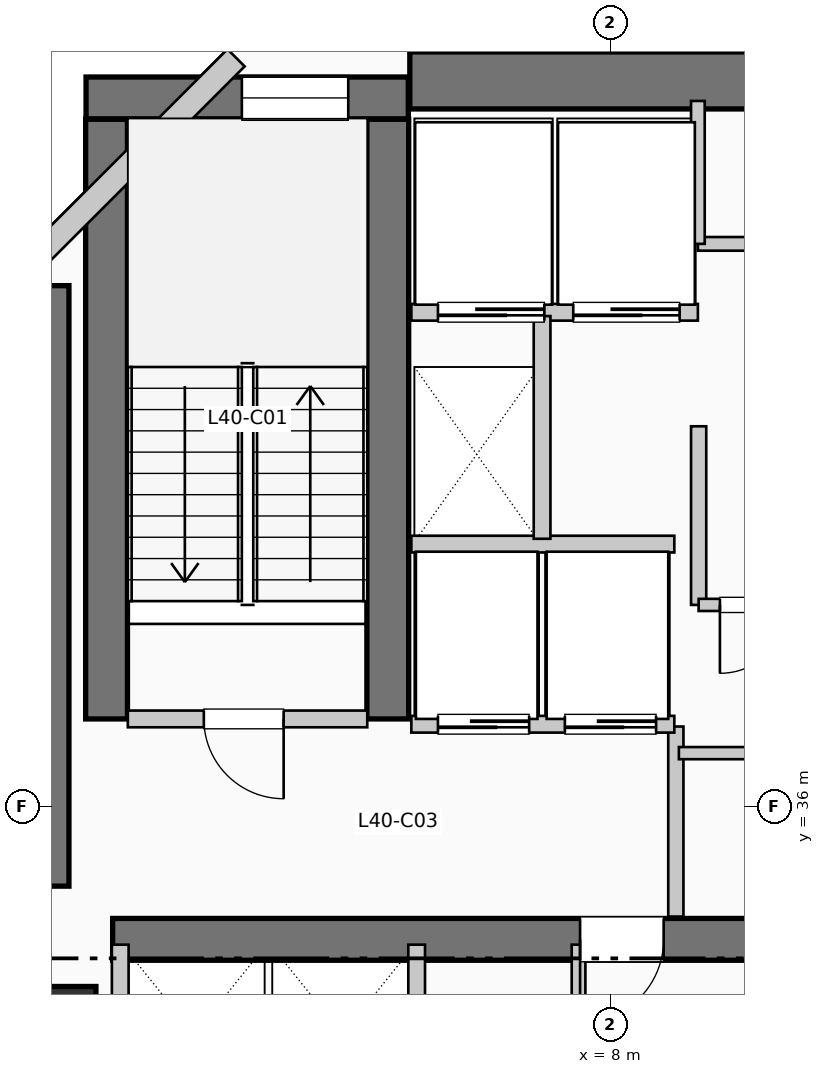
"""IFC4 building model, lengths in metres.
Left out: names, types, materials, properties, quantities, classifications, styles, units other than length and angle.
Written with IfcOpenShell. Run it as: python <this file> out.ifc"""

import sys

from ifc_helpers import new_model, si_unit, direction, frame, frame_2d, origin, origin_2d, place, context, subcontext, project, spatial, rectangle, extrude, element, fill, save


model = new_model("IFC4")
c1 = context("Model", 3, precision=1e-05, world=origin(), true_north=direction((0.0, 1.0)))
c2 = subcontext(c1, "Body", "Model", "MODEL_VIEW")
j1 = project(units=[si_unit("LENGTHUNIT", "METRE"), si_unit("PLANEANGLEUNIT", "RADIAN")], contexts=[c1])
p1 = place(None, origin())
s1 = spatial("IfcSite", under=j1, at=p1, CompositionType="ELEMENT")
p2 = place(p1, origin())
s2 = spatial("IfcBuilding", under=s1, at=p2, CompositionType="ELEMENT")
p3 = place(p2, frame((0.0, 0.0, 166.65)))
s3 = spatial("IfcBuildingStorey", under=s2, at=p3, CompositionType="ELEMENT", Elevation=166.65)
p4 = place(p3, frame((5.36, 45.55, 0.0), z_axis=(0.0, 0.0, 1.0), x_axis=(1.0, 0.0, 0.0)))
e1 = element("IfcWall", 1, at=p4, inside=s3, PredefinedType="SHEAR", context=c2, shape_type="SweptSolid", body=[
    extrude(rectangle(XDim=13.98, YDim=0.75, at=frame_2d((6.99, 0.0))), origin(), (0.0, 0.0, 1.0), 3.96),
])
p5 = place(p3, frame((0.5, 34.95, 0.0), z_axis=(0.0, 0.0, 1.0), x_axis=(0.0, 1.0, 0.0)))
e2 = element("IfcWall", 2, at=p5, inside=s3, PredefinedType="SHEAR", context=c2, shape_type="SweptSolid", body=[
    extrude(rectangle(XDim=7.9, YDim=0.75, at=frame_2d((3.95, 0.0))), origin(), (0.0, 0.0, 1.0), 3.96),
])
p6 = place(p3, frame((1.45, 34.25, 0.0), z_axis=(0.0, 0.0, 1.0), x_axis=(1.0, 0.0, 0.0)))
e3 = element("IfcWall", 3, at=p6, inside=s3, PredefinedType="SHEAR", context=c2, shape_type="SweptSolid", body=[
    extrude(rectangle(XDim=10.71, YDim=0.55, at=frame_2d((5.355, 0.0))), origin(), (0.0, 0.0, 1.0), 3.96),
])
p7 = place(p6, frame((7.25, 0.0, 0.0), z_axis=(0.0, 0.0, 1.0), x_axis=(-1.0, 0.0, 0.0)))
e4 = element("IfcOpeningElement", 4, at=p7, cuts=e3, PredefinedType="OPENING", context=c2, shape_type="SweptSolid", body=[
    extrude(rectangle(XDim=1.1, YDim=2.15, at=frame_2d((0.55, 1.075))), frame((0.0, 0.285, 0.0), z_axis=(0.0, -1.0, 0.0), x_axis=(1.0, 0.0, 0.0)), (0.0, 0.0, 1.0), 0.57),
])
for number, where, z_axis, x_axis in (
    (5, (1.37, 37.15, 0.0), (0.0, 0.0, 1.0), (0.0, 1.0, 0.0)),
    (6, (5.07, 37.15, 0.0), (0.0, 0.0, 1.0), (0.0, 1.0, 0.0)),
):
    element("IfcWall", number, at=place(p3, frame(where, z_axis=z_axis, x_axis=x_axis)), inside=s3, PredefinedType="SHEAR", context=c2, shape_type="SweptSolid", body=[
        extrude(rectangle(XDim=7.89, YDim=0.55, at=frame_2d((3.945, 0.0))), origin(), (0.0, 0.0, 1.0), 3.96),
    ])
p8 = place(p3, frame((1.1, 45.32, 0.0), z_axis=(0.0, 0.0, 1.0), x_axis=(1.0, 0.0, 0.0)))
e7 = element("IfcWall", 7, at=p8, inside=s3, PredefinedType="SHEAR", context=c2, shape_type="SweptSolid", body=[
    extrude(rectangle(XDim=4.24, YDim=0.55, at=frame_2d((2.12, 0.0))), origin(), (0.0, 0.0, 1.0), 3.96),
])
p9 = place(p8, frame((2.05, 0.0, 1.05)))
e8 = element("IfcOpeningElement", 8, at=p9, cuts=e7, PredefinedType="OPENING", context=c2, shape_type="SweptSolid", body=[
    extrude(rectangle(XDim=1.4, YDim=1.8, at=frame_2d((0.7, 0.9))), frame((0.0, 0.285, 0.0), z_axis=(0.0, -1.0, 0.0), x_axis=(1.0, 0.0, 0.0)), (0.0, 0.0, 1.0), 0.57),
])
p10 = place(p3, frame((0.8, 33.2, 0.0), z_axis=(0.0, 0.0, 1.0), x_axis=(1.0, 0.0, 0.0)))
e9 = element("IfcColumn", 9, at=p10, inside=s3, PredefinedType="COLUMN", context=c2, shape_type="SweptSolid", body=[
    extrude(rectangle(XDim=0.86, YDim=0.86, at=origin_2d()), origin(), (0.0, 0.0, 1.0), 3.96),
])
p11 = place(p3, frame((3.074, 45.848, 0.0), z_axis=(0.0, 0.0, 1.0), x_axis=(-0.707106781187, -0.707106781187, 0.0)))
e10 = element("IfcWall", 10, at=p11, inside=s3, PredefinedType="SOLIDWALL", context=c2, shape_type="SweptSolid", body=[
    extrude(rectangle(XDim=4.133, YDim=0.32, at=frame_2d((2.066, 0.0))), origin(), (0.0, 0.0, 1.0), 3.71),
])
p12 = place(p3, frame((1.65, 37.15, 0.0), z_axis=(0.0, 0.0, 1.0), x_axis=(1.0, 0.0, 0.0)))
e11 = element("IfcWall", 11, at=p12, inside=s3, PredefinedType="PARTITIONING", context=c2, shape_type="SweptSolid", body=[
    extrude(rectangle(XDim=3.15, YDim=0.22, at=frame_2d((1.575, 0.0))), origin(), (0.0, 0.0, 1.0), 3.71),
])
p13 = place(p12, frame((2.05, 0.0, 0.0), z_axis=(0.0, 0.0, 1.0), x_axis=(-1.0, 0.0, 0.0)))
e12 = element("IfcOpeningElement", 12, at=p13, cuts=e11, PredefinedType="OPENING", context=c2, shape_type="SweptSolid", body=[
    extrude(rectangle(XDim=1.05, YDim=2.15, at=frame_2d((0.525, 1.075))), frame((0.0, 0.12, 0.0), z_axis=(0.0, -1.0, 0.0), x_axis=(1.0, 0.0, 0.0)), (0.0, 0.0, 1.0), 0.24),
])
p14 = place(p3, frame((8.86, 34.55, 0.0), z_axis=(0.0, 0.0, 1.0), x_axis=(0.0, 1.0, 0.0)))
e13 = element("IfcWall", 13, at=p14, inside=s3, PredefinedType="PARTITIONING", context=c2, shape_type="SweptSolid", body=[
    extrude(rectangle(XDim=2.5, YDim=0.2, at=frame_2d((1.25, 0.0))), origin(), (0.0, 0.0, 1.0), 3.71),
])
p15 = place(p3, frame((5.38, 37.08, 0.0), z_axis=(0.0, 0.0, 1.0), x_axis=(1.0, 0.0, 0.0)))
e14 = element("IfcWall", 14, at=p15, inside=s3, PredefinedType="PARTITIONING", context=c2, shape_type="SweptSolid", body=[
    extrude(rectangle(XDim=3.46, YDim=0.22, at=frame_2d((1.73, 0.0))), origin(), (0.0, 0.0, 1.0), 3.71),
])
p16 = place(p15, frame((1.55, 0.0, 0.0), z_axis=(0.0, 0.0, 1.0), x_axis=(-1.0, 0.0, 0.0)))
e15 = element("IfcOpeningElement", 15, at=p16, cuts=e14, PredefinedType="OPENING", context=c2, shape_type="SweptSolid", body=[
    extrude(rectangle(XDim=1.2, YDim=2.2, at=frame_2d((0.6, 1.1))), frame((0.0, 0.12, 0.0), z_axis=(0.0, -1.0, 0.0), x_axis=(1.0, 0.0, 0.0)), (0.0, 0.0, 1.0), 0.24),
])
p17 = place(p15, frame((3.22, 0.0, 0.0), z_axis=(0.0, 0.0, 1.0), x_axis=(-1.0, 0.0, 0.0)))
e16 = element("IfcOpeningElement", 16, at=p17, cuts=e14, PredefinedType="OPENING", context=c2, shape_type="SweptSolid", body=[
    extrude(rectangle(XDim=1.2, YDim=2.2, at=frame_2d((0.6, 1.1))), frame((0.0, 0.12, 0.0), z_axis=(0.0, -1.0, 0.0), x_axis=(1.0, 0.0, 0.0)), (0.0, 0.0, 1.0), 0.24),
])
p18 = place(p3, frame((5.38, 39.45, 0.0), z_axis=(0.0, 0.0, 1.0), x_axis=(1.0, 0.0, 0.0)))
e17 = element("IfcWall", 17, at=p18, inside=s3, PredefinedType="PARTITIONING", context=c2, shape_type="SweptSolid", body=[
    extrude(rectangle(XDim=3.46, YDim=0.22, at=frame_2d((1.73, 0.0))), origin(), (0.0, 0.0, 1.0), 3.71),
])
p19 = place(p3, frame((5.38, 42.5, 0.0), z_axis=(0.0, 0.0, 1.0), x_axis=(1.0, 0.0, 0.0)))
e18 = element("IfcWall", 18, at=p19, inside=s3, PredefinedType="PARTITIONING", context=c2, shape_type="SweptSolid", body=[
    extrude(rectangle(XDim=3.77, YDim=0.22, at=frame_2d((1.885, 0.0))), origin(), (0.0, 0.0, 1.0), 3.71),
])
p20 = place(p19, frame((1.75, 0.0, 0.0), z_axis=(0.0, 0.0, 1.0), x_axis=(-1.0, 0.0, 0.0)))
e19 = element("IfcOpeningElement", 19, at=p20, cuts=e18, PredefinedType="OPENING", context=c2, shape_type="SweptSolid", body=[
    extrude(rectangle(XDim=1.4, YDim=2.2, at=frame_2d((0.7, 1.1))), frame((0.0, 0.12, 0.0), z_axis=(0.0, -1.0, 0.0), x_axis=(1.0, 0.0, 0.0)), (0.0, 0.0, 1.0), 0.24),
])
p21 = place(p19, frame((3.53, 0.0, 0.0), z_axis=(0.0, 0.0, 1.0), x_axis=(-1.0, 0.0, 0.0)))
e20 = element("IfcOpeningElement", 20, at=p21, cuts=e18, PredefinedType="OPENING", context=c2, shape_type="SweptSolid", body=[
    extrude(rectangle(XDim=1.4, YDim=2.2, at=frame_2d((0.7, 1.1))), frame((0.0, 0.12, 0.0), z_axis=(0.0, -1.0, 0.0), x_axis=(1.0, 0.0, 0.0)), (0.0, 0.0, 1.0), 0.24),
])
p22 = place(p3, frame((7.1, 39.52, 0.0), z_axis=(0.0, 0.0, 1.0), x_axis=(0.0, 1.0, 0.0)))
e21 = element("IfcWall", 21, at=p22, inside=s3, PredefinedType="PARTITIONING", context=c2, shape_type="SweptSolid", body=[
    extrude(rectangle(XDim=2.93, YDim=0.22, at=frame_2d((1.465, 0.0))), origin(), (0.0, 0.0, 1.0), 3.71),
])
for number, where, z_axis, x_axis in (
    (22, (1.55, 31.8, 0.0), (0.0, 0.0, 1.0), (0.0, 1.0, 0.0)),
    (23, (5.45, 31.8, 0.0), (0.0, 0.0, 1.0), (0.0, 1.0, 0.0)),
):
    element("IfcWall", number, at=place(p3, frame(where, z_axis=z_axis, x_axis=x_axis)), inside=s3, PredefinedType="PARTITIONING", context=c2, shape_type="SweptSolid", body=[
        extrude(rectangle(XDim=2.38, YDim=0.22, at=frame_2d((1.19, 0.0))), origin(), (0.0, 0.0, 1.0), 3.71),
    ])
p23 = place(p3, frame((9.16, 38.65, 0.0), z_axis=(0.0, 0.0, 1.0), x_axis=(0.0, 1.0, 0.0)))
e24 = element("IfcWall", 24, at=p23, inside=s3, PredefinedType="PARTITIONING", context=c2, shape_type="SweptSolid", body=[
    extrude(rectangle(XDim=2.35, YDim=0.2, at=frame_2d((1.175, 0.0))), origin(), (0.0, 0.0, 1.0), 3.71),
])
p24 = place(p3, frame((7.58, 31.82, 0.0), z_axis=(0.0, 0.0, 1.0), x_axis=(0.0, 1.0, 0.0)))
e25 = element("IfcWall", 25, at=p24, inside=s3, PredefinedType="PLUMBINGWALL", context=c2, shape_type="SweptSolid", body=[
    extrude(rectangle(XDim=2.36, YDim=0.18, at=frame_2d((1.18, 0.0))), origin(), (0.0, 0.0, 1.0), 3.71),
])
p25 = place(p3, frame((8.9, 36.7, 0.0), z_axis=(0.0, 0.0, 1.0), x_axis=(1.0, 0.0, 0.0)))
e26 = element("IfcWall", 26, at=p25, inside=s3, PredefinedType="PARTITIONING", context=c2, shape_type="SweptSolid", body=[
    extrude(rectangle(XDim=3.25, YDim=0.16, at=frame_2d((1.625, 0.0))), origin(), (0.0, 0.0, 1.0), 3.71),
])
p26 = place(p25, frame((1.1, 0.0, 0.0)))
e27 = element("IfcOpeningElement", 27, at=p26, cuts=e26, PredefinedType="OPENING", context=c2, shape_type="SweptSolid", body=[
    extrude(rectangle(XDim=0.95, YDim=2.15, at=frame_2d((0.475, 1.075))), frame((0.0, 0.09, 0.0), z_axis=(0.0, -1.0, 0.0), x_axis=(1.0, 0.0, 0.0)), (0.0, 0.0, 1.0), 0.18),
])
p27 = place(p3, frame((9.16, 38.65, 0.0), z_axis=(0.0, 0.0, 1.0), x_axis=(1.0, 0.0, 0.0)))
e28 = element("IfcWall", 28, at=p27, inside=s3, PredefinedType="PARTITIONING", context=c2, shape_type="SweptSolid", body=[
    extrude(rectangle(XDim=3.42, YDim=0.16, at=frame_2d((1.71, 0.0))), origin(), (0.0, 0.0, 1.0), 3.71),
])
p28 = place(p27, frame((1.18, 0.0, 0.0), z_axis=(0.0, 0.0, 1.0), x_axis=(-1.0, 0.0, 0.0)))
e29 = element("IfcOpeningElement", 29, at=p28, cuts=e28, PredefinedType="OPENING", context=c2, shape_type="SweptSolid", body=[
    extrude(rectangle(XDim=0.9, YDim=2.15, at=frame_2d((0.45, 1.075))), frame((0.0, 0.09, 0.0), z_axis=(0.0, -1.0, 0.0), x_axis=(1.0, 0.0, 0.0)), (0.0, 0.0, 1.0), 0.18),
])
p29 = place(p27, frame((2.6, 0.0, 0.0), z_axis=(0.0, 0.0, 1.0), x_axis=(-1.0, 0.0, 0.0)))
e30 = element("IfcOpeningElement", 30, at=p29, cuts=e28, PredefinedType="OPENING", context=c2, shape_type="SweptSolid", body=[
    extrude(rectangle(XDim=0.9, YDim=2.15, at=frame_2d((0.45, 1.075))), frame((0.0, 0.09, 0.0), z_axis=(0.0, -1.0, 0.0), x_axis=(1.0, 0.0, 0.0)), (0.0, 0.0, 1.0), 0.18),
])
p30 = place(p3, frame((9.15, 43.4, 0.0), z_axis=(0.0, 0.0, 1.0), x_axis=(1.0, 0.0, 0.0)))
e31 = element("IfcWall", 31, at=p30, inside=s3, PredefinedType="PLUMBINGWALL", context=c2, shape_type="SweptSolid", body=[
    extrude(rectangle(XDim=9.33, YDim=0.18, at=frame_2d((4.665, 0.0))), origin(), (0.0, 0.0, 1.0), 3.71),
])
p31 = place(p30, frame((0.72, 0.0, 0.0)))
e32 = element("IfcOpeningElement", 32, at=p31, cuts=e31, PredefinedType="OPENING", context=c2, shape_type="SweptSolid", body=[
    extrude(rectangle(XDim=0.92, YDim=2.1, at=frame_2d((0.46, 1.05))), frame((0.0, 0.1, 0.0), z_axis=(0.0, -1.0, 0.0), x_axis=(1.0, 0.0, 0.0)), (0.0, 0.0, 1.0), 0.2),
])
p32 = place(p30, frame((3.02, 0.0, 0.0)))
e33 = element("IfcOpeningElement", 33, at=p32, cuts=e31, PredefinedType="OPENING", context=c2, shape_type="SweptSolid", body=[
    extrude(rectangle(XDim=0.92, YDim=2.1, at=frame_2d((0.46, 1.05))), frame((0.0, 0.1, 0.0), z_axis=(0.0, -1.0, 0.0), x_axis=(1.0, 0.0, 0.0)), (0.0, 0.0, 1.0), 0.2),
])
p33 = place(p30, frame((5.34, 0.0, 0.0)))
e34 = element("IfcOpeningElement", 34, at=p33, cuts=e31, PredefinedType="OPENING", context=c2, shape_type="SweptSolid", body=[
    extrude(rectangle(XDim=0.92, YDim=2.1, at=frame_2d((0.46, 1.05))), frame((0.0, 0.1, 0.0), z_axis=(0.0, -1.0, 0.0), x_axis=(1.0, 0.0, 0.0)), (0.0, 0.0, 1.0), 0.2),
])
p34 = place(p30, frame((7.66, 0.0, 0.0)))
e35 = element("IfcOpeningElement", 35, at=p34, cuts=e31, PredefinedType="OPENING", context=c2, shape_type="SweptSolid", body=[
    extrude(rectangle(XDim=0.95, YDim=2.1, at=frame_2d((0.475, 1.05))), frame((0.0, 0.1, 0.0), z_axis=(0.0, -1.0, 0.0), x_axis=(1.0, 0.0, 0.0)), (0.0, 0.0, 1.0), 0.2),
])
p35 = place(p3, frame((9.15, 43.4, 0.0), z_axis=(0.0, 0.0, 1.0), x_axis=(0.0, 1.0, 0.0)))
e36 = element("IfcWall", 36, at=p35, inside=s3, PredefinedType="PLUMBINGWALL", context=c2, shape_type="SweptSolid", body=[
    extrude(rectangle(XDim=1.88, YDim=0.18, at=frame_2d((0.94, 0.0))), origin(), (0.0, 0.0, 1.0), 3.71),
])
p36 = place(p9, origin())
e37 = element("IfcWindow", 37, at=p36, inside=s3, PartitioningType="SINGLE_PANEL", PredefinedType="WINDOW", context=c2, shape_type="SweptSolid", body=[
    extrude(rectangle(XDim=1.4, YDim=1.8, at=frame_2d((0.7, 0.9))), frame((0.0, 0.03, 0.0), z_axis=(0.0, -1.0, 0.0), x_axis=(1.0, 0.0, 0.0)), (0.0, 0.0, 1.0), 0.06),
])
fill(e8, e37)
p37 = place(p13, origin())
e38 = element("IfcDoor", 38, at=p37, inside=s3, OperationType="SINGLE_SWING_RIGHT", PredefinedType="DOOR", context=c2, shape_type="SweptSolid", body=[
    extrude(rectangle(XDim=1.05, YDim=2.15, at=frame_2d((0.525, 1.075))), frame((0.0, 0.025, 0.0), z_axis=(0.0, -1.0, 0.0), x_axis=(1.0, 0.0, 0.0)), (0.0, 0.0, 1.0), 0.05),
])
fill(e12, e38)
p38 = place(p7, origin())
e39 = element("IfcDoor", 39, at=p38, inside=s3, OperationType="SINGLE_SWING_LEFT", PredefinedType="DOOR", context=c2, shape_type="SweptSolid", body=[
    extrude(rectangle(XDim=1.1, YDim=2.15, at=frame_2d((0.55, 1.075))), frame((0.0, 0.025, 0.0), z_axis=(0.0, -1.0, 0.0), x_axis=(1.0, 0.0, 0.0)), (0.0, 0.0, 1.0), 0.05),
])
fill(e4, e39)
p39 = place(p16, origin())
e40 = element("IfcDoor", 40, at=p39, inside=s3, OperationType="SLIDING_TO_RIGHT", PredefinedType="DOOR", context=c2, shape_type="SweptSolid", body=[
    extrude(rectangle(XDim=1.2, YDim=2.2, at=frame_2d((0.6, 1.1))), frame((0.0, 0.025, 0.0), z_axis=(0.0, -1.0, 0.0), x_axis=(1.0, 0.0, 0.0)), (0.0, 0.0, 1.0), 0.05),
])
fill(e15, e40)
p40 = place(p17, origin())
e41 = element("IfcDoor", 41, at=p40, inside=s3, OperationType="SLIDING_TO_RIGHT", PredefinedType="DOOR", context=c2, shape_type="SweptSolid", body=[
    extrude(rectangle(XDim=1.2, YDim=2.2, at=frame_2d((0.6, 1.1))), frame((0.0, 0.025, 0.0), z_axis=(0.0, -1.0, 0.0), x_axis=(1.0, 0.0, 0.0)), (0.0, 0.0, 1.0), 0.05),
])
fill(e16, e41)
p41 = place(p20, origin())
e42 = element("IfcDoor", 42, at=p41, inside=s3, OperationType="SLIDING_TO_LEFT", PredefinedType="DOOR", context=c2, shape_type="SweptSolid", body=[
    extrude(rectangle(XDim=1.4, YDim=2.2, at=frame_2d((0.7, 1.1))), frame((0.0, 0.025, 0.0), z_axis=(0.0, -1.0, 0.0), x_axis=(1.0, 0.0, 0.0)), (0.0, 0.0, 1.0), 0.05),
])
fill(e19, e42)
p42 = place(p21, origin())
e43 = element("IfcDoor", 43, at=p42, inside=s3, OperationType="SLIDING_TO_LEFT", PredefinedType="DOOR", context=c2, shape_type="SweptSolid", body=[
    extrude(rectangle(XDim=1.4, YDim=2.2, at=frame_2d((0.7, 1.1))), frame((0.0, 0.025, 0.0), z_axis=(0.0, -1.0, 0.0), x_axis=(1.0, 0.0, 0.0)), (0.0, 0.0, 1.0), 0.05),
])
fill(e20, e43)
p43 = place(p28, origin())
e44 = element("IfcDoor", 44, at=p43, inside=s3, OperationType="SINGLE_SWING_LEFT", PredefinedType="DOOR", context=c2, shape_type="SweptSolid", body=[
    extrude(rectangle(XDim=0.9, YDim=2.15, at=frame_2d((0.45, 1.075))), frame((0.0, 0.025, 0.0), z_axis=(0.0, -1.0, 0.0), x_axis=(1.0, 0.0, 0.0)), (0.0, 0.0, 1.0), 0.05),
])
fill(e29, e44)
save(model, sys.argv[1])
